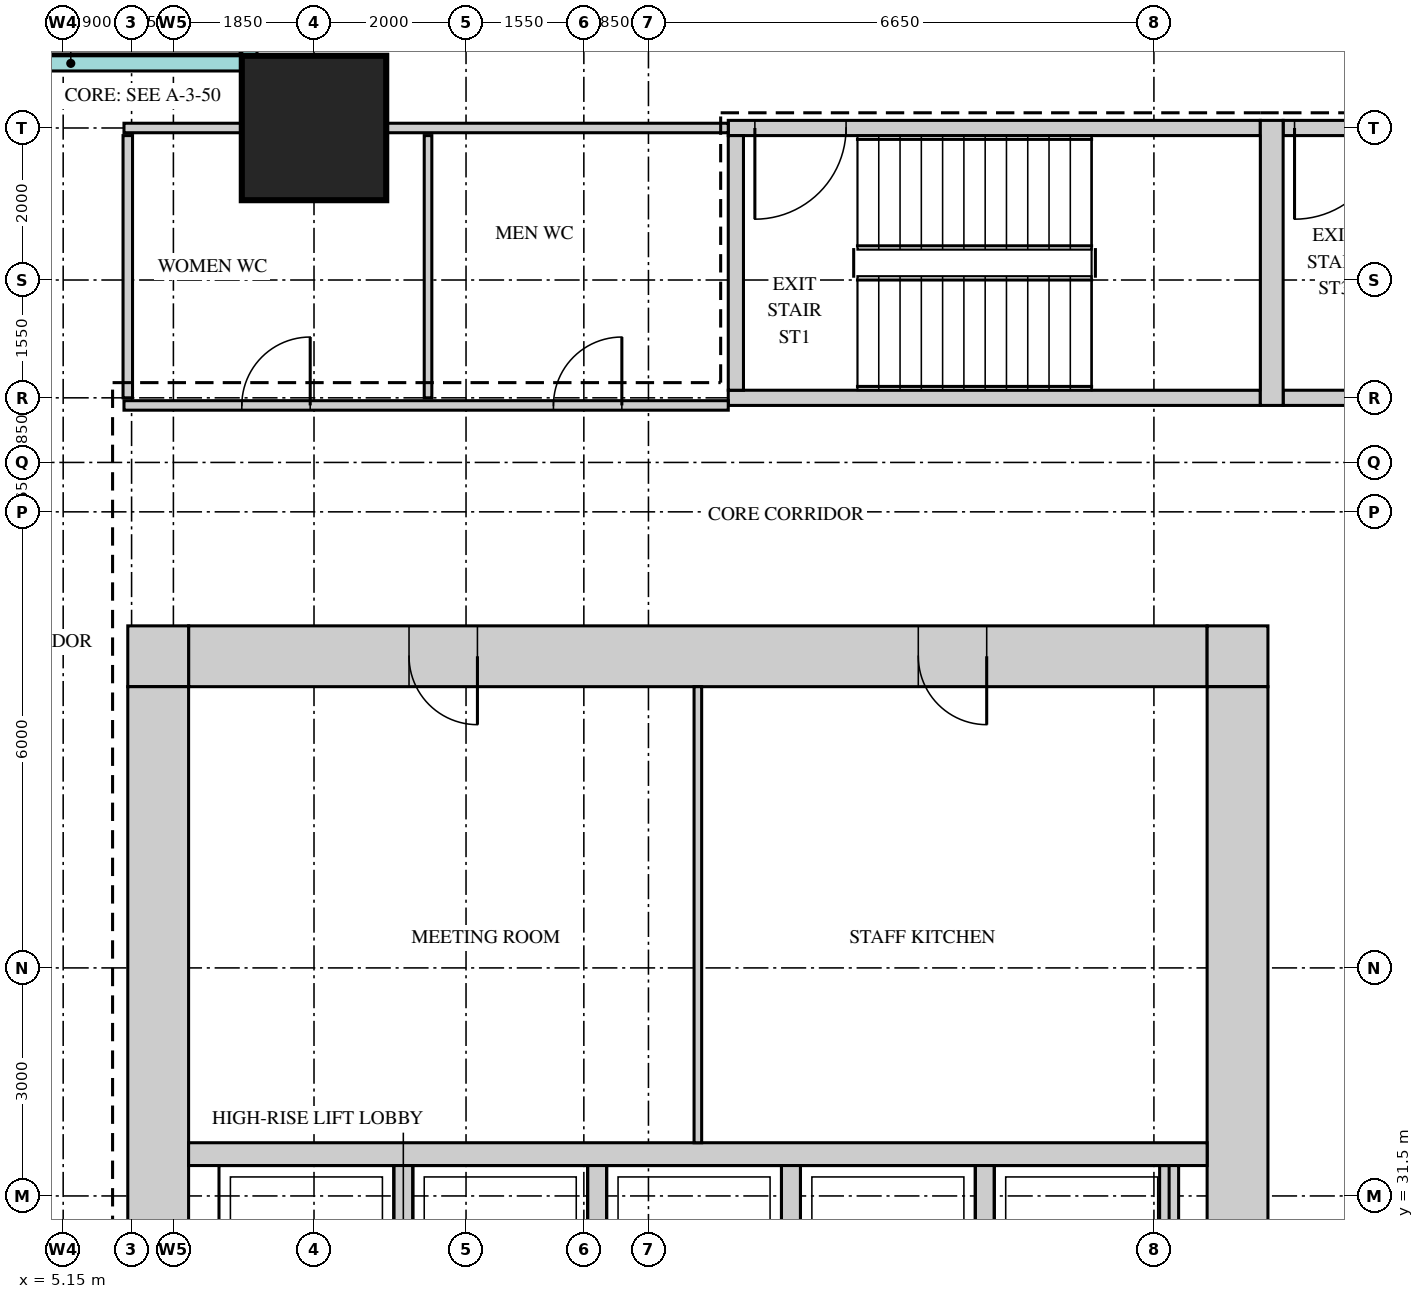
"""IFC4 building model, lengths in metres.
Left out: names, types, materials, properties, quantities, classifications, styles, units other than length and angle.
Written with IfcOpenShell. Run it as: python <this file> out.ifc"""

import sys

from ifc_helpers import new_model, si_unit, direction, frame, frame_2d, origin, origin_2d, place, context, subcontext, project, spatial, rectangle, extrude, source, transform, mapped, element, fill, save


model = new_model("IFC4")
c1 = context("Model", 3, precision=1e-05, world=origin(), true_north=direction((0.0, 1.0)))
c2 = subcontext(c1, "Body", "Model", "MODEL_VIEW")
j1 = project(units=[si_unit("LENGTHUNIT", "METRE"), si_unit("PLANEANGLEUNIT", "RADIAN")], contexts=[c1])
p1 = place(None, origin())
s1 = spatial("IfcSite", under=j1, at=p1, CompositionType="ELEMENT")
p2 = place(p1, origin())
s2 = spatial("IfcBuilding", under=s1, at=p2, CompositionType="ELEMENT")
p3 = place(p2, frame((0.0, 0.0, 164.7)))
s3 = spatial("IfcBuildingStorey", under=s2, at=p3, CompositionType="ELEMENT", Elevation=164.7)
m1 = source(origin(), c2, "Body", "SweptSolid", [
    extrude(rectangle(XDim=13.4, YDim=0.8, at=frame_2d((6.7, 0.0))), origin(), (0.0, 0.0, 1.0), 3.75),
])
p4 = place(p3, frame((6.8, 38.6, 0.0), z_axis=(0.0, 0.0, 1.0), x_axis=(1.0, 0.0, 0.0)))
e1 = element("IfcWall", 1, at=p4, inside=s3, PredefinedType="SHEAR", context=c2, shape_type="MappedRepresentation", body=[
    mapped(m1, transform((0.0, 0.0, 0.0))),
])
m2 = source(origin(), c2, "Body", "SweptSolid", [
    extrude(rectangle(XDim=0.9, YDim=2.1, at=frame_2d((0.45, 1.05))), frame((0.0, 0.41, 0.0), z_axis=(0.0, -1.0, 0.0), x_axis=(1.0, 0.0, 0.0)), (0.0, 0.0, 1.0), 0.82),
])
p5 = place(p4, frame((2.9, 0.0, 0.0)))
e2 = element("IfcOpeningElement", 2, at=p5, cuts=e1, PredefinedType="OPENING", context=c2, shape_type="MappedRepresentation", body=[
    mapped(m2, transform((0.0, 0.0, 0.0))),
])
p6 = place(p4, frame((9.6, 0.0, 0.0)))
e3 = element("IfcOpeningElement", 3, at=p6, cuts=e1, PredefinedType="OPENING", context=c2, shape_type="MappedRepresentation", body=[
    mapped(m2, transform((0.0, 0.0, 0.0))),
])
m3 = source(origin(), c2, "Body", "SweptSolid", [
    extrude(rectangle(XDim=0.8, YDim=0.8, at=frame_2d((0.4, 0.0))), origin(), (0.0, 0.0, 1.0), 3.75),
])
for number, where, z_axis, x_axis in (
    (4, (20.2, 38.6, 0.0), (0.0, 0.0, 1.0), (1.0, 0.0, 0.0)),
    (5, (6.0, 38.6, 0.0), (0.0, 0.0, 1.0), (1.0, 0.0, 0.0)),
):
    element("IfcWall", number, at=place(p3, frame(where, z_axis=z_axis, x_axis=x_axis)), inside=s3, PredefinedType="SHEAR", context=c2, shape_type="MappedRepresentation", body=[
        mapped(m3, transform((0.0, 0.0, 0.0))),
    ])
m4 = source(origin(), c2, "Body", "SweptSolid", [
    extrude(rectangle(XDim=22.4, YDim=0.8, at=frame_2d((11.2, 0.0))), origin(), (0.0, 0.0, 1.0), 3.75),
])
p7 = place(p3, frame((20.6, 15.8, 0.0), z_axis=(0.0, 0.0, 1.0), x_axis=(0.0, 1.0, 0.0)))
e6 = element("IfcWall", 6, at=p7, inside=s3, PredefinedType="SHEAR", context=c2, shape_type="MappedRepresentation", body=[
    mapped(m4, transform((0.0, 0.0, 0.0))),
])
m5 = source(origin(), c2, "Body", "SweptSolid", [
    extrude(rectangle(XDim=1.8, YDim=2.1, at=frame_2d((0.9, 1.05))), frame((0.0, 0.41, 0.0), z_axis=(0.0, -1.0, 0.0), x_axis=(1.0, 0.0, 0.0)), (0.0, 0.0, 1.0), 0.82),
])
p8 = place(p7, frame((10.7, 0.0, 0.0)))
e7 = element("IfcOpeningElement", 7, at=p8, cuts=e6, PredefinedType="OPENING", context=c2, shape_type="MappedRepresentation", body=[
    mapped(m5, transform((0.0, 0.0, 0.0))),
])
p9 = place(p7, frame((0.35, 0.0, 0.0)))
e8 = element("IfcOpeningElement", 8, at=p9, cuts=e6, PredefinedType="OPENING", context=c2, shape_type="MappedRepresentation", body=[
    mapped(m2, transform((0.0, 0.0, 0.0))),
])
p10 = place(p7, frame((2.8, 0.0, 0.0)))
e9 = element("IfcOpeningElement", 9, at=p10, cuts=e6, PredefinedType="OPENING", context=c2, shape_type="MappedRepresentation", body=[
    mapped(m2, transform((0.0, 0.0, 0.0))),
])
p11 = place(p7, frame((5.55, 0.0, 0.0)))
e10 = element("IfcOpeningElement", 10, at=p11, cuts=e6, PredefinedType="OPENING", context=c2, shape_type="MappedRepresentation", body=[
    mapped(m2, transform((0.0, 0.0, 0.0))),
])
p12 = place(p3, frame((6.4, 15.8, 0.0), z_axis=(0.0, 0.0, 1.0), x_axis=(0.0, 1.0, 0.0)))
e11 = element("IfcWall", 11, at=p12, inside=s3, PredefinedType="SHEAR", context=c2, shape_type="MappedRepresentation", body=[
    mapped(m4, transform((0.0, 0.0, 0.0))),
])
m6 = source(origin(), c2, "Body", "SweptSolid", [
    extrude(rectangle(XDim=7.0, YDim=0.2, at=frame_2d((3.5, 0.0))), origin(), (0.0, 0.0, 1.0), 3.75),
])
p13 = place(p3, frame((13.9, 45.55, 0.0), z_axis=(0.0, 0.0, 1.0), x_axis=(1.0, 0.0, 0.0)))
e12 = element("IfcWall", 12, at=p13, inside=s3, PredefinedType="SHEAR", context=c2, shape_type="MappedRepresentation", body=[
    mapped(m6, transform((0.0, 0.0, 0.0))),
])
m7 = source(origin(), c2, "Body", "SweptSolid", [
    extrude(rectangle(XDim=1.2, YDim=2.1, at=frame_2d((0.6, 1.05))), frame((0.0, 0.11, 0.0), z_axis=(0.0, -1.0, 0.0), x_axis=(1.0, 0.0, 0.0)), (0.0, 0.0, 1.0), 0.22),
])
p14 = place(p13, frame((0.35, 0.0, 0.0)))
e13 = element("IfcOpeningElement", 13, at=p14, cuts=e12, PredefinedType="OPENING", context=c2, shape_type="MappedRepresentation", body=[
    mapped(m7, transform((0.0, 0.0, 0.0))),
])
p15 = place(p3, frame((13.9, 42.0, 0.0), z_axis=(0.0, 0.0, 1.0), x_axis=(1.0, 0.0, 0.0)))
e14 = element("IfcWall", 14, at=p15, inside=s3, PredefinedType="SHEAR", context=c2, shape_type="MappedRepresentation", body=[
    mapped(m6, transform((0.0, 0.0, 0.0))),
])
m8 = source(origin(), c2, "Body", "SweptSolid", [
    extrude(rectangle(XDim=7.1, YDim=0.2, at=frame_2d((3.55, 0.0))), origin(), (0.0, 0.0, 1.0), 3.75),
])
p16 = place(p3, frame((21.2, 45.55, 0.0), z_axis=(0.0, 0.0, 1.0), x_axis=(1.0, 0.0, 0.0)))
e15 = element("IfcWall", 15, at=p16, inside=s3, PredefinedType="SHEAR", context=c2, shape_type="MappedRepresentation", body=[
    mapped(m8, transform((0.0, 0.0, 0.0))),
])
p17 = place(p16, frame((0.15, 0.0, 0.0)))
e16 = element("IfcOpeningElement", 16, at=p17, cuts=e15, PredefinedType="OPENING", context=c2, shape_type="MappedRepresentation", body=[
    mapped(m7, transform((0.0, 0.0, 0.0))),
])
p18 = place(p3, frame((21.2, 42.0, 0.0), z_axis=(0.0, 0.0, 1.0), x_axis=(1.0, 0.0, 0.0)))
e17 = element("IfcWall", 17, at=p18, inside=s3, PredefinedType="SHEAR", context=c2, shape_type="MappedRepresentation", body=[
    mapped(m8, transform((0.0, 0.0, 0.0))),
])
m9 = source(origin(), c2, "Body", "SweptSolid", [
    extrude(rectangle(XDim=3.75, YDim=0.3, at=frame_2d((1.875, 0.0))), origin(), (0.0, 0.0, 1.0), 3.75),
])
p19 = place(p3, frame((21.05, 41.9, 0.0), z_axis=(0.0, 0.0, 1.0), x_axis=(0.0, 1.0, 0.0)))
e18 = element("IfcWall", 18, at=p19, inside=s3, PredefinedType="SHEAR", context=c2, shape_type="MappedRepresentation", body=[
    mapped(m9, transform((0.0, 0.0, 0.0))),
])
m10 = source(origin(), c2, "Body", "SweptSolid", [
    extrude(rectangle(XDim=3.35, YDim=0.2, at=frame_2d((1.675, 0.0))), origin(), (0.0, 0.0, 1.0), 3.75),
])
p20 = place(p3, frame((14.0, 42.1, 0.0), z_axis=(0.0, 0.0, 1.0), x_axis=(0.0, 1.0, 0.0)))
e19 = element("IfcWall", 19, at=p20, inside=s3, PredefinedType="SHEAR", context=c2, shape_type="MappedRepresentation", body=[
    mapped(m10, transform((0.0, 0.0, 0.0))),
])
m11 = source(origin(), c2, "Body", "SweptSolid", [
    extrude(rectangle(XDim=13.4, YDim=0.3, at=frame_2d((6.7, 0.0))), origin(), (0.0, 0.0, 1.0), 3.75),
])
p21 = place(p3, frame((6.8, 32.05, 0.0), z_axis=(0.0, 0.0, 1.0), x_axis=(1.0, 0.0, 0.0)))
e20 = element("IfcWall", 20, at=p21, inside=s3, PredefinedType="STANDARD", context=c2, shape_type="MappedRepresentation", body=[
    mapped(m11, transform((0.0, 0.0, 0.0))),
])
m12 = source(origin(), c2, "Body", "SweptSolid", [
    extrude(rectangle(XDim=2.4, YDim=0.25, at=frame_2d((1.2, 0.0))), origin(), (0.0, 0.0, 1.0), 3.75),
])
for number, where, z_axis, x_axis in (
    (21, (17.275, 29.5, 0.0), (0.0, 0.0, 1.0), (0.0, 1.0, 0.0)),
    (22, (19.7, 29.5, 0.0), (0.0, 0.0, 1.0), (0.0, 1.0, 0.0)),
    (23, (9.625, 29.5, 0.0), (0.0, 0.0, 1.0), (0.0, 1.0, 0.0)),
    (24, (12.175, 29.5, 0.0), (0.0, 0.0, 1.0), (0.0, 1.0, 0.0)),
    (25, (14.725, 29.5, 0.0), (0.0, 0.0, 1.0), (0.0, 1.0, 0.0)),
):
    element("IfcWall", number, at=place(p3, frame(where, z_axis=z_axis, x_axis=x_axis)), inside=s3, PredefinedType="STANDARD", context=c2, shape_type="MappedRepresentation", body=[
        mapped(m12, transform((0.0, 0.0, 0.0))),
    ])
m13 = source(origin(), c2, "Body", "SweptSolid", [
    extrude(rectangle(XDim=1.9, YDim=1.9, at=origin_2d()), origin(), (0.0, 0.0, 1.0), 4.0),
])
p22 = place(p3, frame((8.45, 45.55, 0.0), z_axis=(0.0, 0.0, 1.0), x_axis=(1.0, 0.0, 0.0)))
e26 = element("IfcColumn", 26, at=p22, inside=s3, PredefinedType="COLUMN", context=c2, shape_type="MappedRepresentation", body=[
    mapped(m13, transform((0.0, 0.0, 0.0))),
])
m14 = source(origin(), c2, "Body", "SweptSolid", [
    extrude(rectangle(XDim=4.5, YDim=0.25, at=frame_2d((2.25, 0.0))), origin(), (0.0, 0.0, 1.0), 1.1),
])
p23 = place(p3, frame((3.0, 46.625, 0.0), z_axis=(0.0, 0.0, 1.0), x_axis=(1.0, 0.0, 0.0)))
e27 = element("IfcWall", 27, at=p23, inside=s3, PredefinedType="SOLIDWALL", context=c2, shape_type="MappedRepresentation", body=[
    mapped(m14, transform((0.0, 0.0, 0.0))),
])
m15 = source(origin(), c2, "Body", "SweptSolid", [
    extrude(rectangle(XDim=6.0, YDim=0.1, at=frame_2d((3.0, 0.0))), origin(), (0.0, 0.0, 1.0), 3.8),
])
p24 = place(p3, frame((13.5, 32.2, 0.0), z_axis=(0.0, 0.0, 1.0), x_axis=(0.0, 1.0, 0.0)))
e28 = element("IfcWall", 28, at=p24, inside=s3, PredefinedType="PARTITIONING", context=c2, shape_type="MappedRepresentation", body=[
    mapped(m15, transform((0.0, 0.0, 0.0))),
])
m16 = source(origin(), c2, "Body", "SweptSolid", [
    extrude(rectangle(XDim=7.95, YDim=0.125, at=frame_2d((3.975, 0.0))), origin(), (0.0, 0.0, 1.0), 3.8),
])
p25 = place(p3, frame((5.95, 41.9, 0.0), z_axis=(0.0, 0.0, 1.0), x_axis=(1.0, 0.0, 0.0)))
e29 = element("IfcWall", 29, at=p25, inside=s3, PredefinedType="PARTITIONING", context=c2, shape_type="MappedRepresentation", body=[
    mapped(m16, transform((0.0, 0.0, 0.0))),
])
m17 = source(origin(), c2, "Body", "SweptSolid", [
    extrude(rectangle(XDim=0.9, YDim=2.1, at=frame_2d((0.45, 1.05))), frame((0.0, 0.073, 0.0), z_axis=(0.0, -1.0, 0.0), x_axis=(1.0, 0.0, 0.0)), (0.0, 0.0, 1.0), 0.145),
])
p26 = place(p25, frame((1.55, 0.0, 0.0)))
e30 = element("IfcOpeningElement", 30, at=p26, cuts=e29, PredefinedType="OPENING", context=c2, shape_type="MappedRepresentation", body=[
    mapped(m17, transform((0.0, 0.0, 0.0))),
])
p27 = place(p25, frame((5.65, 0.0, 0.0)))
e31 = element("IfcOpeningElement", 31, at=p27, cuts=e29, PredefinedType="OPENING", context=c2, shape_type="MappedRepresentation", body=[
    mapped(m17, transform((0.0, 0.0, 0.0))),
])
m18 = source(origin(), c2, "Body", "SweptSolid", [
    extrude(rectangle(XDim=3.45, YDim=0.125, at=frame_2d((1.725, 0.0))), origin(), (0.0, 0.0, 1.0), 3.8),
])
p28 = place(p3, frame((6.0, 42.0, 0.0), z_axis=(0.0, 0.0, 1.0), x_axis=(0.0, 1.0, 0.0)))
e32 = element("IfcWall", 32, at=p28, inside=s3, PredefinedType="PARTITIONING", context=c2, shape_type="MappedRepresentation", body=[
    mapped(m18, transform((0.0, 0.0, 0.0))),
])
m19 = source(origin(), c2, "Body", "SweptSolid", [
    extrude(rectangle(XDim=3.45, YDim=0.1, at=frame_2d((1.725, 0.0))), origin(), (0.0, 0.0, 1.0), 3.8),
])
p29 = place(p3, frame((9.95, 42.0, 0.0), z_axis=(0.0, 0.0, 1.0), x_axis=(0.0, 1.0, 0.0)))
e33 = element("IfcWall", 33, at=p29, inside=s3, PredefinedType="PARTITIONING", context=c2, shape_type="MappedRepresentation", body=[
    mapped(m19, transform((0.0, 0.0, 0.0))),
])
m20 = source(origin(), c2, "Body", "SweptSolid", [
    extrude(rectangle(XDim=7.95, YDim=0.125, at=frame_2d((3.975, 0.0))), origin(), (0.0, 0.0, 1.0), 3.25),
])
p30 = place(p3, frame((5.95, 45.55, 0.0), z_axis=(0.0, 0.0, 1.0), x_axis=(1.0, 0.0, 0.0)))
e34 = element("IfcWall", 34, at=p30, inside=s3, PredefinedType="PARTITIONING", context=c2, shape_type="MappedRepresentation", body=[
    mapped(m20, transform((0.0, 0.0, 0.0))),
])
m21 = source(origin(), c2, "Body", "SweptSolid", [
    extrude(rectangle(XDim=0.9, YDim=2.1, at=frame_2d((0.45, 1.05))), frame((0.0, 0.35, 0.0), z_axis=(0.0, -1.0, 0.0), x_axis=(1.0, 0.0, 0.0)), (0.0, 0.0, 1.0), 0.7),
])
p31 = place(p5, origin())
e35 = element("IfcDoor", 35, at=p31, inside=s3, OperationType="SINGLE_SWING_RIGHT", PredefinedType="DOOR", context=c2, shape_type="MappedRepresentation", body=[
    mapped(m21, transform((0.0, 0.0, 0.0))),
])
fill(e2, e35)
p32 = place(p6, origin())
e36 = element("IfcDoor", 36, at=p32, inside=s3, OperationType="SINGLE_SWING_RIGHT", PredefinedType="DOOR", context=c2, shape_type="MappedRepresentation", body=[
    mapped(m21, transform((0.0, 0.0, 0.0))),
])
fill(e3, e36)
m22 = source(origin(), c2, "Body", "SweptSolid", [
    extrude(rectangle(XDim=0.9, YDim=2.1, at=frame_2d((0.45, 1.05))), frame((0.0, 0.025, 0.0), z_axis=(0.0, -1.0, 0.0), x_axis=(1.0, 0.0, 0.0)), (0.0, 0.0, 1.0), 0.05),
])
p33 = place(p26, origin())
e37 = element("IfcDoor", 37, at=p33, inside=s3, OperationType="SINGLE_SWING_LEFT", PredefinedType="DOOR", context=c2, shape_type="MappedRepresentation", body=[
    mapped(m22, transform((0.0, 0.0, 0.0))),
])
fill(e30, e37)
p34 = place(p27, origin())
e38 = element("IfcDoor", 38, at=p34, inside=s3, OperationType="SINGLE_SWING_LEFT", PredefinedType="DOOR", context=c2, shape_type="MappedRepresentation", body=[
    mapped(m22, transform((0.0, 0.0, 0.0))),
])
fill(e31, e38)
m23 = source(origin(), c2, "Body", "SweptSolid", [
    extrude(rectangle(XDim=1.2, YDim=2.1, at=frame_2d((0.6, 1.05))), frame((0.0, 0.025, 0.0), z_axis=(0.0, -1.0, 0.0), x_axis=(1.0, 0.0, 0.0)), (0.0, 0.0, 1.0), 0.05),
])
p35 = place(p14, origin())
e39 = element("IfcDoor", 39, at=p35, inside=s3, OperationType="SINGLE_SWING_LEFT", PredefinedType="DOOR", context=c2, shape_type="MappedRepresentation", body=[
    mapped(m23, transform((0.0, 0.0, 0.0))),
])
fill(e13, e39)
p36 = place(p17, origin())
e40 = element("IfcDoor", 40, at=p36, inside=s3, OperationType="SINGLE_SWING_LEFT", PredefinedType="DOOR", context=c2, shape_type="MappedRepresentation", body=[
    mapped(m23, transform((0.0, 0.0, 0.0))),
])
fill(e16, e40)
save(model, sys.argv[1])
